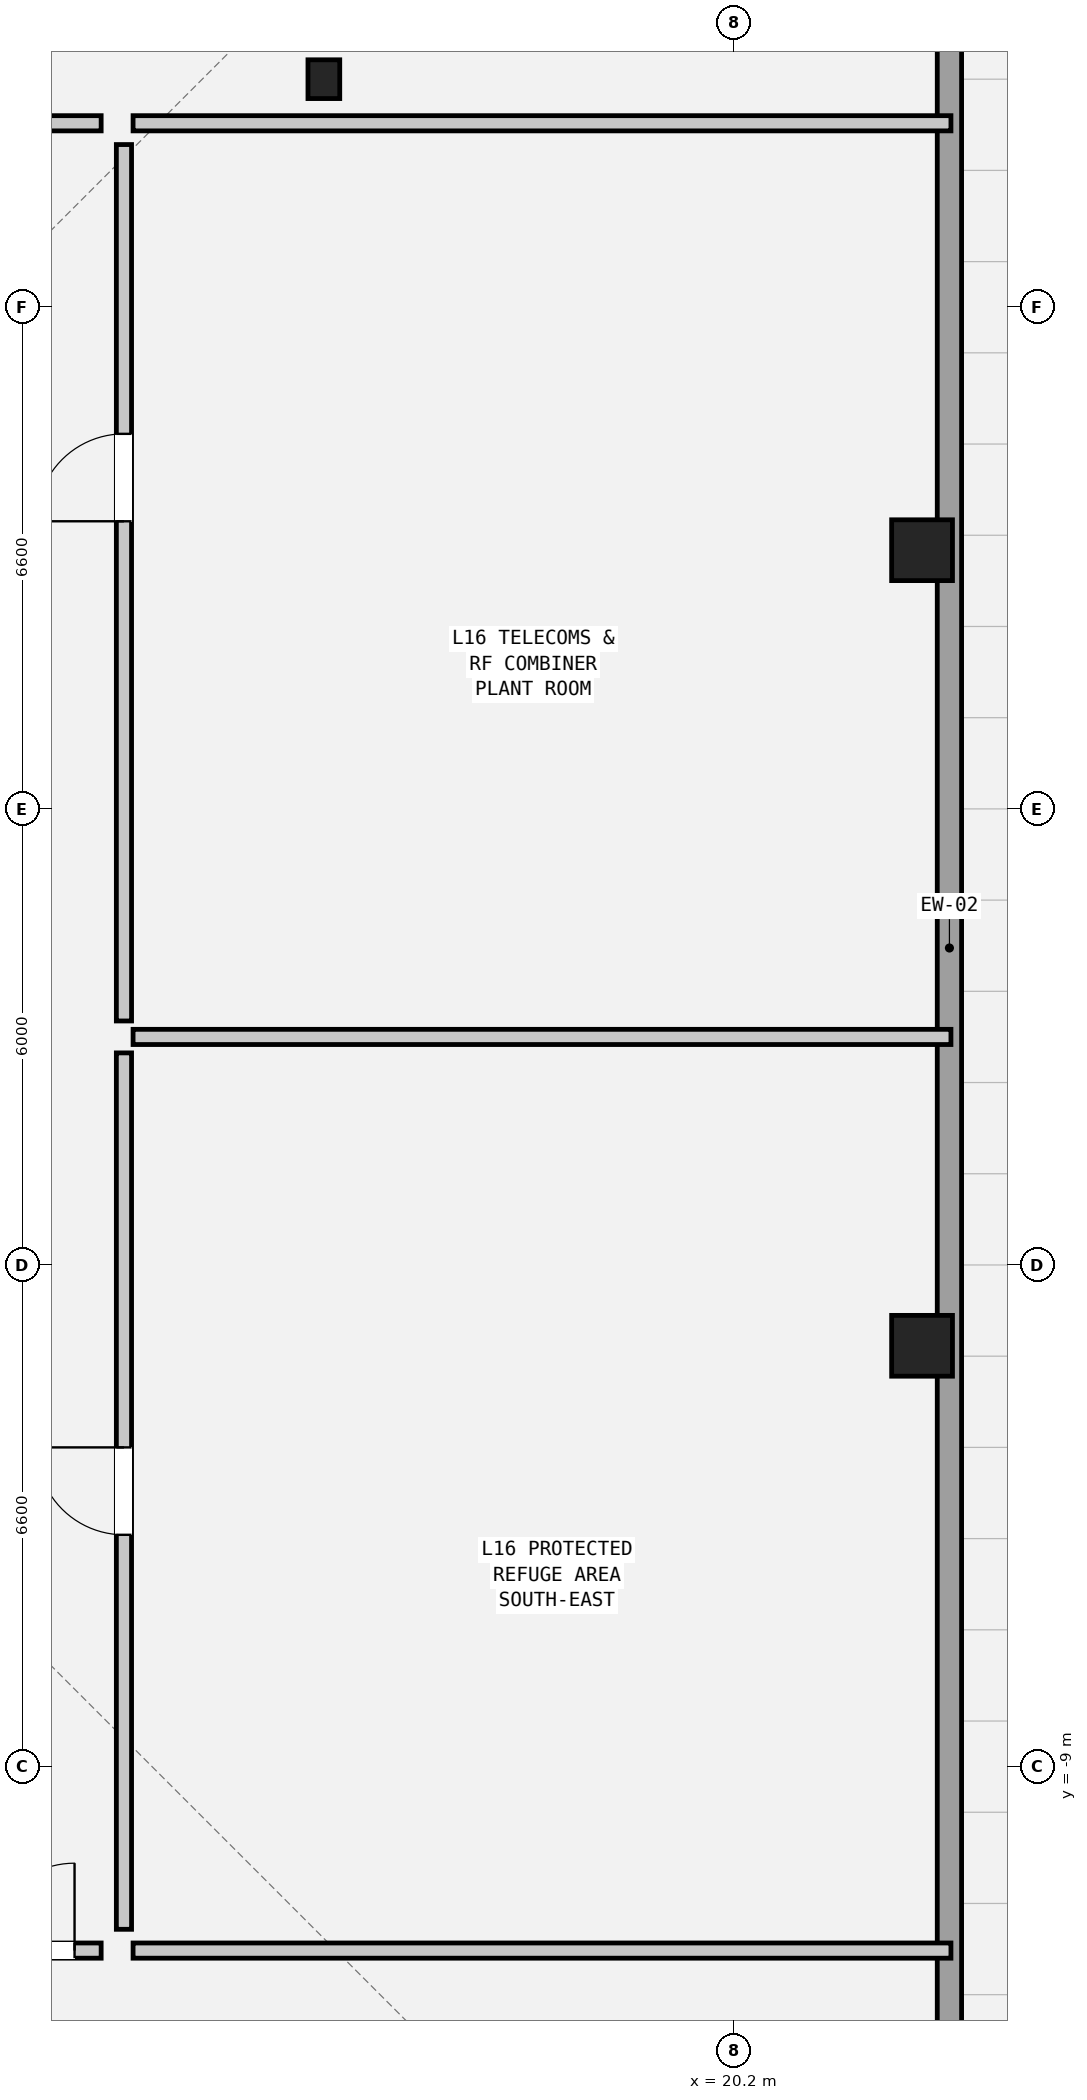
"""IFC4 building model, lengths in metres.
Left out: names, types, materials, properties, quantities, classifications, styles, units other than length and angle.
Written with IfcOpenShell. Run it as: python <this file> out.ifc"""

import sys

from ifc_helpers import new_model, si_unit, direction, frame, frame_2d, origin, origin_2d, place, context, subcontext, project, spatial, rectangle, hollow_rectangle, i_section, extrude, element, fill, save


model = new_model("IFC4")
c1 = context("Model", 3, precision=1e-05, world=origin(), true_north=direction((0.0, 1.0)))
c2 = subcontext(c1, "Body", "Model", "MODEL_VIEW")
j1 = project(units=[si_unit("LENGTHUNIT", "METRE"), si_unit("PLANEANGLEUNIT", "RADIAN")], contexts=[c1])
p1 = place(None, origin())
s1 = spatial("IfcSite", under=j1, at=p1, CompositionType="ELEMENT")
p2 = place(p1, origin())
s2 = spatial("IfcBuilding", under=s1, at=p2, CompositionType="ELEMENT")
p3 = place(p2, frame((0.0, 0.0, 57.9)))
s3 = spatial("IfcBuildingStorey", under=s2, at=p3, CompositionType="ELEMENT", Elevation=57.9)
for number, where, z_axis, x_axis in (
    (1, (22.67, -3.463, 0.0), (0.0, 0.0, 1.0), (0.0, 1.0, 0.0)),
    (2, (22.67, 7.003, 0.0), (0.0, 0.0, 1.0), (0.0, 1.0, 0.0)),
):
    element("IfcColumn", number, at=place(p3, frame(where, z_axis=z_axis, x_axis=x_axis)), inside=s3, PredefinedType="COLUMN", context=c2, shape_type="SweptSolid", body=[
        extrude(hollow_rectangle(XDim=0.8, YDim=0.8, WallThickness=0.05, at=origin_2d()), origin(), (0.0, 0.0, 1.0), 3.6),
    ])
p4 = place(p3, frame((14.8, 13.2, 0.0), z_axis=(0.0, 0.0, 1.0), x_axis=(1.0, 0.0, 0.0)))
e3 = element("IfcColumn", 3, at=p4, inside=s3, PredefinedType="COLUMN", context=c2, shape_type="SweptSolid", body=[
    extrude(i_section(OverallWidth=0.418, OverallDepth=0.51, WebThickness=0.042, FlangeThickness=0.068, at=origin_2d()), origin(), (0.0, 0.0, 1.0), 3.6),
])
p5 = place(p3, frame((23.03, 17.082, 0.0), z_axis=(0.0, 0.0, 1.0), x_axis=(0.0, -1.0, 0.0)))
e4 = element("IfcWall", 4, at=p5, inside=s3, PredefinedType="SOLIDWALL", context=c2, shape_type="SweptSolid", body=[
    extrude(rectangle(XDim=30.624, YDim=0.32, at=frame_2d((15.312, 0.0))), origin(), (0.0, 0.0, 1.0), 2.242),
])
p6 = place(p3, frame((5.98, 12.62, 0.0), z_axis=(0.0, 0.0, 1.0), x_axis=(1.0, 0.0, 0.0)))
e5 = element("IfcWall", 5, at=p6, inside=s3, PredefinedType="PARTITIONING", context=c2, shape_type="SweptSolid", body=[
    extrude(rectangle(XDim=5.89, YDim=0.2, at=frame_2d((2.945, 0.0))), origin(), (0.0, 0.0, 1.0), 3.38),
])
p7 = place(p6, frame((2.37, 0.0, 0.0)))
e6 = element("IfcOpeningElement", 6, at=p7, cuts=e5, PredefinedType="OPENING", context=c2, shape_type="SweptSolid", body=[
    extrude(rectangle(XDim=1.15, YDim=2.1, at=frame_2d((0.575, 1.05))), frame((0.0, 0.112, 0.0), z_axis=(0.0, -1.0, 0.0), x_axis=(1.0, 0.0, 0.0)), (0.0, 0.0, 1.0), 0.224),
])
p8 = place(p3, frame((5.98, -11.42, 0.0), z_axis=(0.0, 0.0, 1.0), x_axis=(1.0, 0.0, 0.0)))
e7 = element("IfcWall", 7, at=p8, inside=s3, PredefinedType="PARTITIONING", context=c2, shape_type="SweptSolid", body=[
    extrude(rectangle(XDim=5.89, YDim=0.2, at=frame_2d((2.945, 0.0))), origin(), (0.0, 0.0, 1.0), 2.901),
])
p9 = place(p8, frame((4.39, 0.0, 0.0)))
e8 = element("IfcOpeningElement", 8, at=p9, cuts=e7, PredefinedType="OPENING", context=c2, shape_type="SweptSolid", body=[
    extrude(rectangle(XDim=1.15, YDim=2.1, at=frame_2d((0.575, 1.05))), frame((0.0, 0.112, 0.0), z_axis=(0.0, -1.0, 0.0), x_axis=(1.0, 0.0, 0.0)), (0.0, 0.0, 1.0), 0.224),
])
p10 = place(p3, frame((12.29, 12.62, 0.0), z_axis=(0.0, 0.0, 1.0), x_axis=(1.0, 0.0, 0.0)))
e9 = element("IfcWall", 9, at=p10, inside=s3, PredefinedType="PARTITIONING", context=c2, shape_type="SweptSolid", body=[
    extrude(rectangle(XDim=10.76, YDim=0.2, at=frame_2d((5.38, 0.0))), origin(), (0.0, 0.0, 1.0), 3.38),
])
for number, where, z_axis, x_axis in (
    (10, (12.29, -11.42, 0.0), (0.0, 0.0, 1.0), (1.0, 0.0, 0.0)),
    (11, (12.29, 0.6, 0.0), (0.0, 0.0, 1.0), (1.0, 0.0, 0.0)),
):
    element("IfcWall", number, at=place(p3, frame(where, z_axis=z_axis, x_axis=x_axis)), inside=s3, PredefinedType="PARTITIONING", context=c2, shape_type="SweptSolid", body=[
        extrude(rectangle(XDim=10.76, YDim=0.2, at=frame_2d((5.38, 0.0))), origin(), (0.0, 0.0, 1.0), 2.901),
    ])
p11 = place(p3, frame((12.17, -11.14, 0.0), z_axis=(0.0, 0.0, 1.0), x_axis=(0.0, 1.0, 0.0)))
e12 = element("IfcWall", 12, at=p11, inside=s3, PredefinedType="PARTITIONING", context=c2, shape_type="SweptSolid", body=[
    extrude(rectangle(XDim=11.53, YDim=0.2, at=frame_2d((5.765, 0.0))), origin(), (0.0, 0.0, 1.0), 3.38),
])
p12 = place(p11, frame((5.19, 0.0, 0.0)))
e13 = element("IfcOpeningElement", 13, at=p12, cuts=e12, PredefinedType="OPENING", context=c2, shape_type="SweptSolid", body=[
    extrude(rectangle(XDim=1.15, YDim=2.1, at=frame_2d((0.575, 1.05))), frame((0.0, 0.112, 0.0), z_axis=(0.0, -1.0, 0.0), x_axis=(1.0, 0.0, 0.0)), (0.0, 0.0, 1.0), 0.224),
])
p13 = place(p3, frame((12.17, 0.81, 0.0), z_axis=(0.0, 0.0, 1.0), x_axis=(0.0, 1.0, 0.0)))
e14 = element("IfcWall", 14, at=p13, inside=s3, PredefinedType="PARTITIONING", context=c2, shape_type="SweptSolid", body=[
    extrude(rectangle(XDim=11.53, YDim=0.2, at=frame_2d((5.765, 0.0))), origin(), (0.0, 0.0, 1.0), 3.38),
])
p14 = place(p13, frame((6.574, 0.0, 0.0)))
e15 = element("IfcOpeningElement", 15, at=p14, cuts=e14, PredefinedType="OPENING", context=c2, shape_type="SweptSolid", body=[
    extrude(rectangle(XDim=1.15, YDim=2.1, at=frame_2d((0.575, 1.05))), frame((0.0, 0.112, 0.0), z_axis=(0.0, -1.0, 0.0), x_axis=(1.0, 0.0, 0.0)), (0.0, 0.0, 1.0), 0.224),
])
p15 = place(p9, origin())
e16 = element("IfcDoor", 16, at=p15, inside=s3, OperationType="SINGLE_SWING_RIGHT", PredefinedType="DOOR", context=c2, shape_type="SweptSolid", body=[
    extrude(rectangle(XDim=1.15, YDim=2.1, at=frame_2d((0.575, 1.05))), frame((0.0, 0.025, 0.0), z_axis=(0.0, -1.0, 0.0), x_axis=(1.0, 0.0, 0.0)), (0.0, 0.0, 1.0), 0.05),
])
fill(e8, e16)
p16 = place(p12, origin())
e17 = element("IfcDoor", 17, at=p16, inside=s3, OperationType="SINGLE_SWING_RIGHT", PredefinedType="DOOR", context=c2, shape_type="SweptSolid", body=[
    extrude(rectangle(XDim=1.15, YDim=2.1, at=frame_2d((0.575, 1.05))), frame((0.0, 0.025, 0.0), z_axis=(0.0, -1.0, 0.0), x_axis=(1.0, 0.0, 0.0)), (0.0, 0.0, 1.0), 0.05),
])
fill(e13, e17)
p17 = place(p14, origin())
e18 = element("IfcDoor", 18, at=p17, inside=s3, OperationType="SINGLE_SWING_LEFT", PredefinedType="DOOR", context=c2, shape_type="SweptSolid", body=[
    extrude(rectangle(XDim=1.15, YDim=2.1, at=frame_2d((0.575, 1.05))), frame((0.0, 0.025, 0.0), z_axis=(0.0, -1.0, 0.0), x_axis=(1.0, 0.0, 0.0)), (0.0, 0.0, 1.0), 0.05),
])
fill(e15, e18)
save(model, sys.argv[1])
